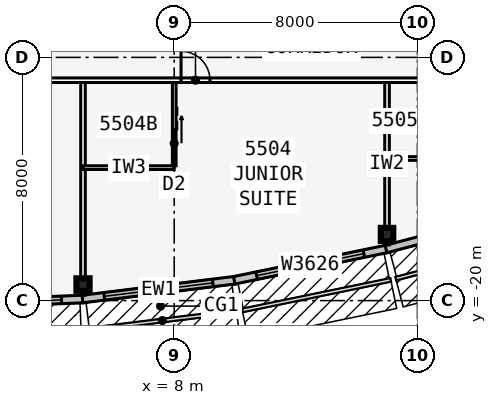
"""IFC4 building model, lengths in metres.
Left out: names, types, materials, properties, quantities, classifications, styles, units other than length and angle.
Written with IfcOpenShell. Run it as: python <this file> out.ifc"""

import sys

from ifc_helpers import new_model, si_unit, direction, frame, frame_2d, origin, origin_2d, place, context, subcontext, project, spatial, rectangle, i_section, extrude, element, fill, save


model = new_model("IFC4")
c1 = context("Model", 3, precision=1e-05, world=origin(), true_north=direction((0.0, 1.0)))
c2 = subcontext(c1, "Body", "Model", "MODEL_VIEW")
j1 = project(units=[si_unit("LENGTHUNIT", "METRE"), si_unit("PLANEANGLEUNIT", "RADIAN")], contexts=[c1])
p1 = place(None, origin())
s1 = spatial("IfcSite", under=j1, at=p1, CompositionType="ELEMENT")
p2 = place(p1, origin())
s2 = spatial("IfcBuilding", under=s1, at=p2, CompositionType="ELEMENT")
p3 = place(p2, frame((0.0, 0.0, 208.1)))
s3 = spatial("IfcBuildingStorey", under=s2, at=p3, CompositionType="ELEMENT", Elevation=208.1)
for number, where, z_axis, x_axis in (
    (1, (5.0, -19.472, 0.0), (0.0, 0.0, 1.0), (0.0, -1.0, 0.0)),
    (2, (15.0, -17.825, 0.0), (0.0, 0.0, 1.0), (1.0, 0.0, 0.0)),
):
    element("IfcColumn", number, at=place(p3, frame(where, z_axis=z_axis, x_axis=x_axis)), inside=s3, PredefinedType="COLUMN", context=c2, shape_type="SweptSolid", body=[
        extrude(i_section(OverallWidth=0.411, OverallDepth=0.434, WebThickness=0.036, FlangeThickness=0.057, at=origin_2d()), origin(), (0.0, 0.0, 1.0), 3.6),
    ])
p4 = place(p3, frame((-0.005, -20.153, 0.0), z_axis=(0.0, 0.0, 1.0), x_axis=(0.999151909423, 0.041175986892, 0.0)))
e3 = element("IfcWall", 3, at=p4, inside=s3, PredefinedType="STANDARD", context=c2, shape_type="SweptSolid", body=[
    extrude(rectangle(XDim=5.004, YDim=0.25, at=frame_2d((2.502, 0.0))), origin(), (0.0, 0.0, 1.0), 3.435),
])
p5 = place(p4, frame((0.702, 0.0, 0.45)))
e4 = element("IfcOpeningElement", 4, at=p5, cuts=e3, PredefinedType="OPENING", context=c2, shape_type="SweptSolid", body=[
    extrude(rectangle(XDim=3.6, YDim=2.6, at=frame_2d((1.8, 1.3))), frame((0.0, 0.135, 0.0), z_axis=(0.0, -1.0, 0.0), x_axis=(1.0, 0.0, 0.0)), (0.0, 0.0, 1.0), 0.27),
])
p6 = place(p3, frame((4.985, -19.948, 0.0), z_axis=(0.0, 0.0, 1.0), x_axis=(0.992449874964, 0.12265090984, 0.0)))
e5 = element("IfcWall", 5, at=p6, inside=s3, PredefinedType="STANDARD", context=c2, shape_type="SweptSolid", body=[
    extrude(rectangle(XDim=5.038, YDim=0.25, at=frame_2d((2.519, 0.0))), origin(), (0.0, 0.0, 1.0), 3.435),
])
p7 = place(p6, frame((0.719, 0.0, 0.45)))
e6 = element("IfcOpeningElement", 6, at=p7, cuts=e5, PredefinedType="OPENING", context=c2, shape_type="SweptSolid", body=[
    extrude(rectangle(XDim=3.6, YDim=2.6, at=frame_2d((1.8, 1.3))), frame((0.0, 0.135, 0.0), z_axis=(0.0, -1.0, 0.0), x_axis=(1.0, 0.0, 0.0)), (0.0, 0.0, 1.0), 0.27),
])
p8 = place(p3, frame((9.975, -19.332, 0.0), z_axis=(0.0, 0.0, 1.0), x_axis=(0.979461488189, 0.201631329795, 0.0)))
e7 = element("IfcWall", 7, at=p8, inside=s3, PredefinedType="STANDARD", context=c2, shape_type="SweptSolid", body=[
    extrude(rectangle(XDim=5.105, YDim=0.25, at=frame_2d((2.552, 0.0))), origin(), (0.0, 0.0, 1.0), 3.435),
])
p9 = place(p8, frame((0.752, 0.0, 0.45)))
e8 = element("IfcOpeningElement", 8, at=p9, cuts=e7, PredefinedType="OPENING", context=c2, shape_type="SweptSolid", body=[
    extrude(rectangle(XDim=3.6, YDim=2.6, at=frame_2d((1.8, 1.3))), frame((0.0, 0.135, 0.0), z_axis=(0.0, -1.0, 0.0), x_axis=(1.0, 0.0, 0.0)), (0.0, 0.0, 1.0), 0.27),
])
p10 = place(p3, frame((14.968, -18.304, 0.0), z_axis=(0.0, 0.0, 1.0), x_axis=(0.967010286052, 0.254737328772, 0.0)))
e9 = element("IfcWall", 9, at=p10, inside=s3, PredefinedType="STANDARD", context=c2, shape_type="SweptSolid", body=[
    extrude(rectangle(XDim=2.068, YDim=0.25, at=frame_2d((1.034, 0.0))), origin(), (0.0, 0.0, 1.0), 3.435),
])
p11 = place(p3, frame((-21.236, -12.751, 0.0), z_axis=(0.0, 0.0, 1.0), x_axis=(1.0, 0.0, 0.0)))
e10 = element("IfcWall", 10, at=p11, inside=s3, PredefinedType="PARTITIONING", context=c2, shape_type="SweptSolid", body=[
    extrude(rectangle(XDim=42.472, YDim=0.15, at=frame_2d((21.236, 0.0))), origin(), (0.0, 0.0, 1.0), 3.435),
])
p12 = place(p11, frame((2.661, 0.0, 0.0)))
e11 = element("IfcOpeningElement", 11, at=p12, cuts=e10, PredefinedType="OPENING", context=c2, shape_type="SweptSolid", body=[
    extrude(rectangle(XDim=0.95, YDim=2.13, at=frame_2d((0.475, 1.065))), frame((0.0, 0.085, 0.0), z_axis=(0.0, -1.0, 0.0), x_axis=(1.0, 0.0, 0.0)), (0.0, 0.0, 1.0), 0.17),
])
p13 = place(p11, frame((8.261, 0.0, 0.0)))
e12 = element("IfcOpeningElement", 12, at=p13, cuts=e10, PredefinedType="OPENING", context=c2, shape_type="SweptSolid", body=[
    extrude(rectangle(XDim=0.95, YDim=2.13, at=frame_2d((0.475, 1.065))), frame((0.0, 0.085, 0.0), z_axis=(0.0, -1.0, 0.0), x_axis=(1.0, 0.0, 0.0)), (0.0, 0.0, 1.0), 0.17),
])
p14 = place(p11, frame((18.861, 0.0, 0.0)))
e13 = element("IfcOpeningElement", 13, at=p14, cuts=e10, PredefinedType="OPENING", context=c2, shape_type="SweptSolid", body=[
    extrude(rectangle(XDim=0.95, YDim=2.13, at=frame_2d((0.475, 1.065))), frame((0.0, 0.085, 0.0), z_axis=(0.0, -1.0, 0.0), x_axis=(1.0, 0.0, 0.0)), (0.0, 0.0, 1.0), 0.17),
])
p15 = place(p11, frame((23.236, 0.0, 0.0)))
e14 = element("IfcOpeningElement", 14, at=p15, cuts=e10, PredefinedType="OPENING", context=c2, shape_type="SweptSolid", body=[
    extrude(rectangle(XDim=1.0, YDim=2.13, at=frame_2d((0.5, 1.065))), frame((0.0, 0.085, 0.0), z_axis=(0.0, -1.0, 0.0), x_axis=(1.0, 0.0, 0.0)), (0.0, 0.0, 1.0), 0.17),
])
p16 = place(p11, frame((29.461, 0.0, 0.0)))
e15 = element("IfcOpeningElement", 15, at=p16, cuts=e10, PredefinedType="OPENING", context=c2, shape_type="SweptSolid", body=[
    extrude(rectangle(XDim=0.95, YDim=2.13, at=frame_2d((0.475, 1.065))), frame((0.0, 0.085, 0.0), z_axis=(0.0, -1.0, 0.0), x_axis=(1.0, 0.0, 0.0)), (0.0, 0.0, 1.0), 0.17),
])
p17 = place(p11, frame((38.861, 0.0, 0.0)))
e16 = element("IfcOpeningElement", 16, at=p17, cuts=e10, PredefinedType="OPENING", context=c2, shape_type="SweptSolid", body=[
    extrude(rectangle(XDim=0.95, YDim=2.13, at=frame_2d((0.475, 1.065))), frame((0.0, 0.085, 0.0), z_axis=(0.0, -1.0, 0.0), x_axis=(1.0, 0.0, 0.0)), (0.0, 0.0, 1.0), 0.17),
])
p18 = place(p3, frame((5.0, -12.826, 0.0), z_axis=(0.0, 0.0, 1.0), x_axis=(0.0, -1.0, 0.0)))
e17 = element("IfcWall", 17, at=p18, inside=s3, PredefinedType="PARTITIONING", context=c2, shape_type="SweptSolid", body=[
    extrude(rectangle(XDim=6.994, YDim=0.15, at=frame_2d((3.497, 0.0))), origin(), (0.0, 0.0, 1.0), 2.589),
])
p19 = place(p3, frame((15.0, -12.826, 0.0), z_axis=(0.0, 0.0, 1.0), x_axis=(0.0, -1.0, 0.0)))
e18 = element("IfcWall", 18, at=p19, inside=s3, PredefinedType="PARTITIONING", context=c2, shape_type="SweptSolid", body=[
    extrude(rectangle(XDim=5.34, YDim=0.15, at=frame_2d((2.67, 0.0))), origin(), (0.0, 0.0, 1.0), 2.589),
])
p20 = place(p3, frame((5.0, -15.626, 0.0), z_axis=(0.0, 0.0, 1.0), x_axis=(1.0, 0.0, 0.0)))
e19 = element("IfcWall", 19, at=p20, inside=s3, PredefinedType="PLUMBINGWALL", context=c2, shape_type="SweptSolid", body=[
    extrude(rectangle(XDim=3.0, YDim=0.12, at=frame_2d((1.5, 0.0))), origin(), (0.0, 0.0, 1.0), 3.435),
])
p21 = place(p3, frame((8.0, -12.826, 0.0), z_axis=(0.0, 0.0, 1.0), x_axis=(0.0, -1.0, 0.0)))
e20 = element("IfcWall", 20, at=p21, inside=s3, PredefinedType="PLUMBINGWALL", context=c2, shape_type="SweptSolid", body=[
    extrude(rectangle(XDim=2.74, YDim=0.12, at=frame_2d((1.37, 0.0))), origin(), (0.0, 0.0, 1.0), 3.435),
])
p22 = place(p21, frame((1.55, 0.0, 0.0)))
e21 = element("IfcOpeningElement", 21, at=p22, cuts=e20, PredefinedType="OPENING", context=c2, shape_type="SweptSolid", body=[
    extrude(rectangle(XDim=0.9, YDim=2.13, at=frame_2d((0.45, 1.065))), frame((0.0, 0.07, 0.0), z_axis=(0.0, -1.0, 0.0), x_axis=(1.0, 0.0, 0.0)), (0.0, 0.0, 1.0), 0.14),
])
p23 = place(p3, frame((15.0, -15.326, 0.0), z_axis=(0.0, 0.0, 1.0), x_axis=(1.0, 0.0, 0.0)))
e22 = element("IfcWall", 22, at=p23, inside=s3, PredefinedType="PLUMBINGWALL", context=c2, shape_type="SweptSolid", body=[
    extrude(rectangle(XDim=2.4, YDim=0.12, at=frame_2d((1.2, 0.0))), origin(), (0.0, 0.0, 1.0), 3.435),
])
p24 = place(p5, origin())
e23 = element("IfcWindow", 23, at=p24, inside=s3, PartitioningType="SINGLE_PANEL", PredefinedType="WINDOW", context=c2, shape_type="SweptSolid", body=[
    extrude(rectangle(XDim=3.6, YDim=2.6, at=frame_2d((1.8, 1.3))), frame((0.0, 0.03, 0.0), z_axis=(0.0, -1.0, 0.0), x_axis=(1.0, 0.0, 0.0)), (0.0, 0.0, 1.0), 0.06),
])
fill(e4, e23)
p25 = place(p7, origin())
e24 = element("IfcWindow", 24, at=p25, inside=s3, PartitioningType="SINGLE_PANEL", PredefinedType="WINDOW", context=c2, shape_type="SweptSolid", body=[
    extrude(rectangle(XDim=3.6, YDim=2.6, at=frame_2d((1.8, 1.3))), frame((0.0, 0.03, 0.0), z_axis=(0.0, -1.0, 0.0), x_axis=(1.0, 0.0, 0.0)), (0.0, 0.0, 1.0), 0.06),
])
fill(e6, e24)
p26 = place(p9, origin())
e25 = element("IfcWindow", 25, at=p26, inside=s3, PartitioningType="SINGLE_PANEL", PredefinedType="WINDOW", context=c2, shape_type="SweptSolid", body=[
    extrude(rectangle(XDim=3.6, YDim=2.6, at=frame_2d((1.8, 1.3))), frame((0.0, 0.03, 0.0), z_axis=(0.0, -1.0, 0.0), x_axis=(1.0, 0.0, 0.0)), (0.0, 0.0, 1.0), 0.06),
])
fill(e8, e25)
p27 = place(p22, origin())
e26 = element("IfcDoor", 26, at=p27, inside=s3, OperationType="SLIDING_TO_LEFT", PredefinedType="DOOR", context=c2, shape_type="SweptSolid", body=[
    extrude(rectangle(XDim=0.9, YDim=2.13, at=frame_2d((0.45, 1.065))), frame((0.0, 0.025, 0.0), z_axis=(0.0, -1.0, 0.0), x_axis=(1.0, 0.0, 0.0)), (0.0, 0.0, 1.0), 0.05),
])
fill(e21, e26)
p28 = place(p16, origin())
e27 = element("IfcDoor", 27, at=p28, inside=s3, OperationType="SINGLE_SWING_LEFT", PredefinedType="DOOR", context=c2, shape_type="SweptSolid", body=[
    extrude(rectangle(XDim=0.95, YDim=2.13, at=frame_2d((0.475, 1.065))), frame((0.0, 0.025, 0.0), z_axis=(0.0, -1.0, 0.0), x_axis=(1.0, 0.0, 0.0)), (0.0, 0.0, 1.0), 0.05),
])
fill(e15, e27)
save(model, sys.argv[1])
